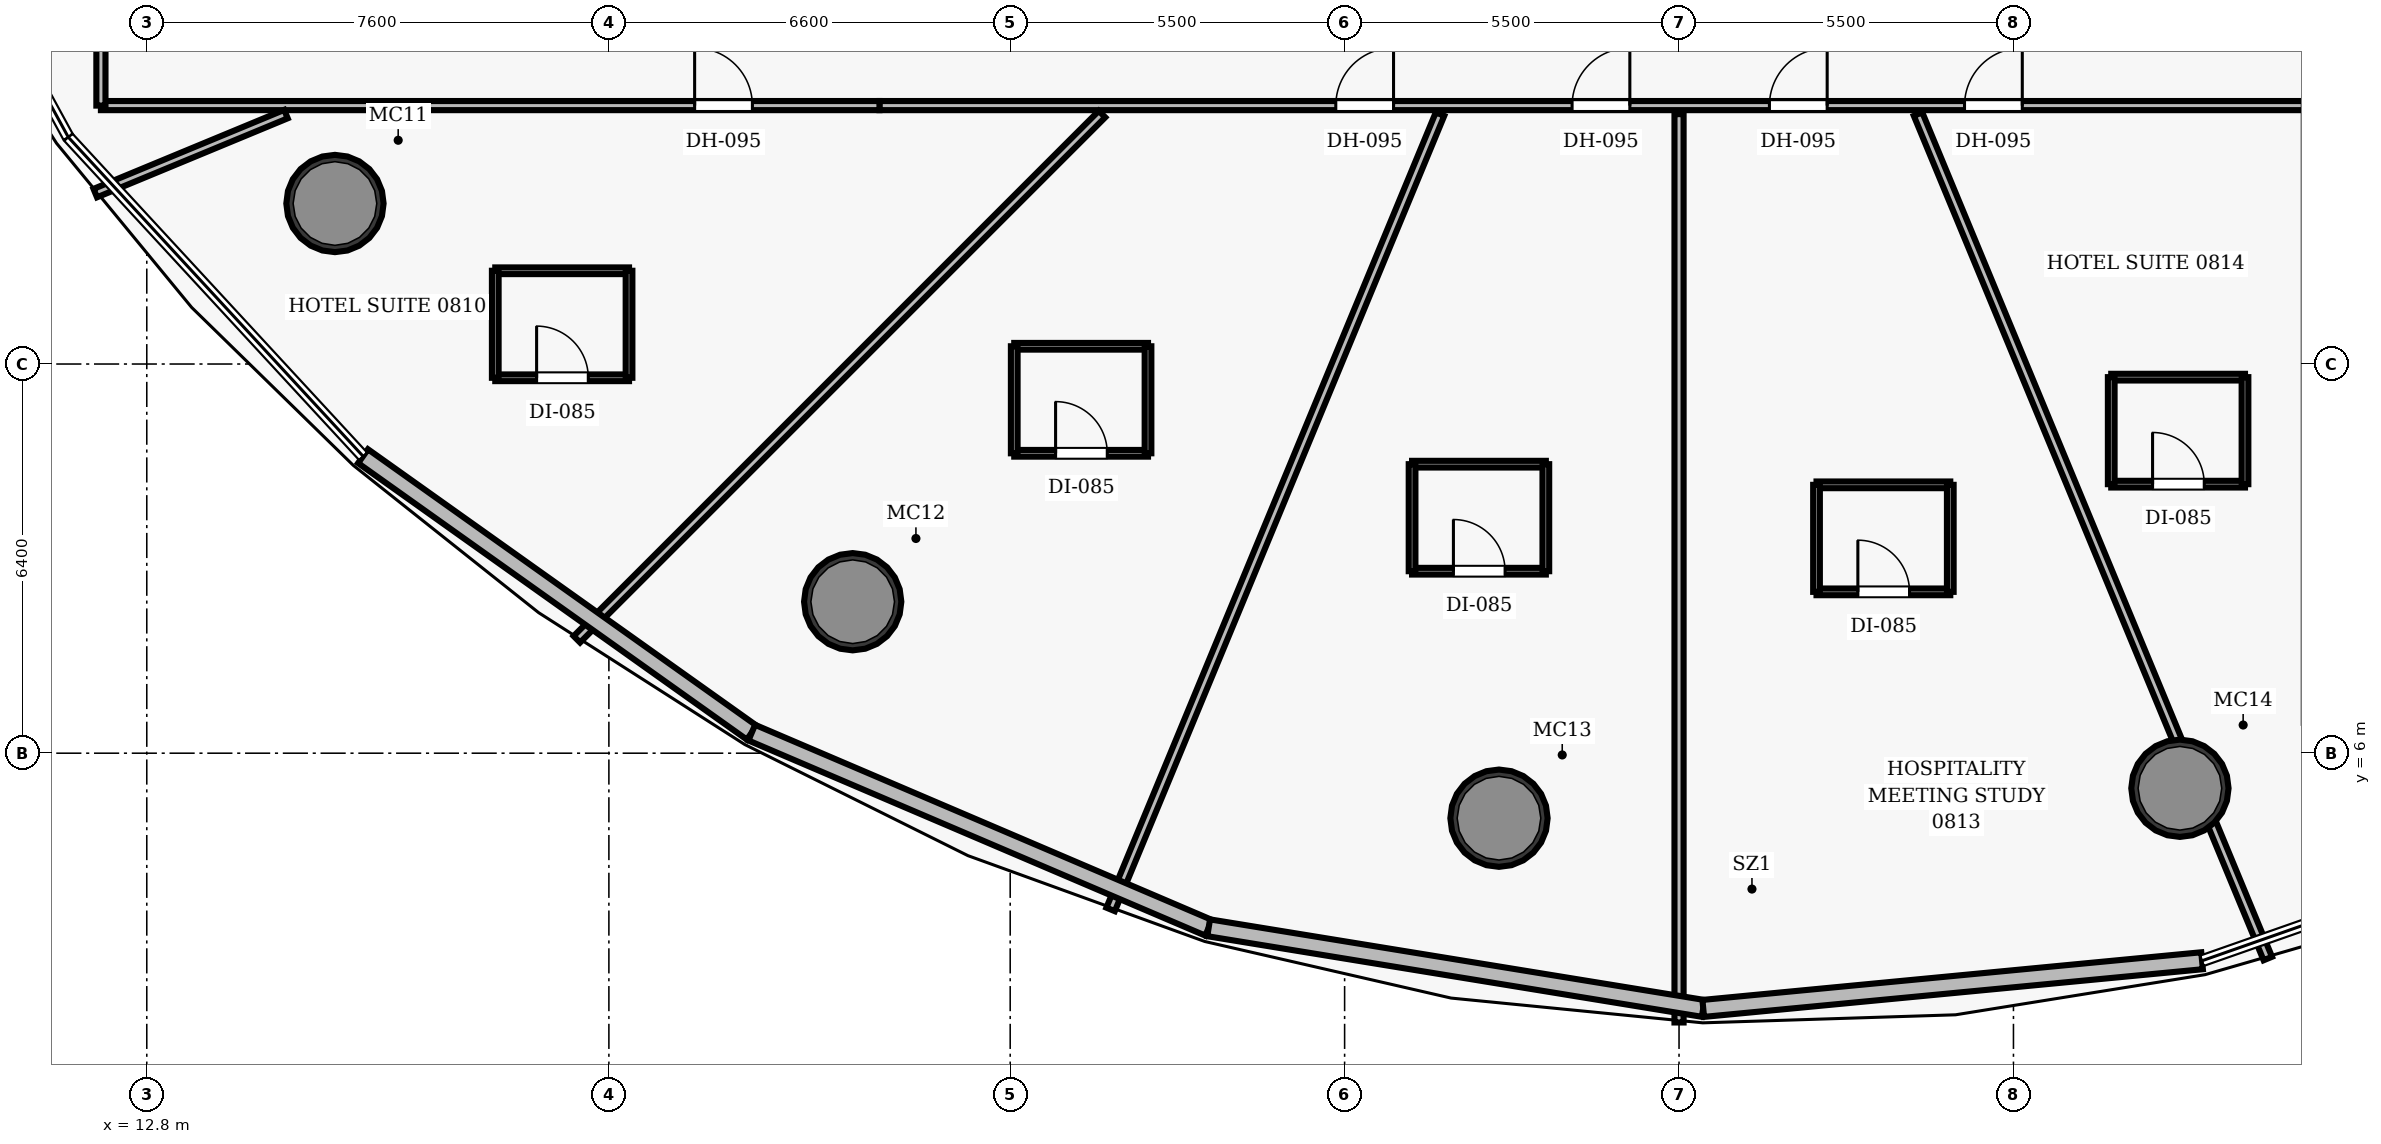
"""IFC4 building model, lengths in metres.
Left out: names, types, materials, properties, quantities, classifications, styles, units other than length and angle.
Written with IfcOpenShell. Run it as: python <this file> out.ifc"""

import sys

from ifc_helpers import new_model, si_unit, direction, frame, frame_2d, origin, origin_2d, place, context, subcontext, project, spatial, rectangle, hollow_circle, extrude, element, fill, save


model = new_model("IFC4")
c1 = context("Model", 3, precision=1e-05, world=origin(), true_north=direction((0.0, 1.0)))
c2 = subcontext(c1, "Body", "Model", "MODEL_VIEW")
j1 = project(units=[si_unit("LENGTHUNIT", "METRE"), si_unit("PLANEANGLEUNIT", "RADIAN")], contexts=[c1])
p1 = place(None, origin())
s1 = spatial("IfcSite", under=j1, at=p1, CompositionType="ELEMENT")
p2 = place(p1, origin())
s2 = spatial("IfcBuilding", under=s1, at=p2, CompositionType="ELEMENT")
p3 = place(p2, frame((0.0, 0.0, 44.9)))
s3 = spatial("IfcBuildingStorey", under=s2, at=p3, CompositionType="ELEMENT", Elevation=44.9)
for number, where, z_axis, x_axis in (
    (1, (15.895, 15.04, 0.0), (0.0, 0.0, 1.0), (1.0, 0.0, 0.0)),
    (2, (24.41, 8.491, 0.0), (0.0, 0.0, 1.0), (1.0, 0.0, 0.0)),
    (3, (35.039, 4.931, 0.0), (0.0, 0.0, 1.0), (1.0, 0.0, 0.0)),
    (4, (46.238, 5.423, 0.0), (0.0, 0.0, 1.0), (1.0, 0.0, 0.0)),
):
    element("IfcColumn", number, at=place(p3, frame(where, z_axis=z_axis, x_axis=x_axis)), inside=s3, PredefinedType="COLUMN", context=c2, shape_type="SweptSolid", body=[
        extrude(hollow_circle(Radius=0.8, WallThickness=0.06, at=origin_2d()), origin(), (0.0, 0.0, 1.0), 3.5),
    ])
p4 = place(p3, frame((24.85, 16.65, 0.0), z_axis=(0.0, 0.0, 1.0), x_axis=(1.0, 0.0, 0.0)))
e5 = element("IfcWall", 5, at=p4, inside=s3, PredefinedType="PARTITIONING", context=c2, shape_type="SweptSolid", body=[
    extrude(rectangle(XDim=23.5, YDim=0.15, at=frame_2d((11.75, 0.0))), origin(), (0.0, 0.0, 1.0), 2.6),
])
p5 = place(p4, frame((7.505, 0.0, 0.0)))
e6 = element("IfcOpeningElement", 6, at=p5, cuts=e5, PredefinedType="OPENING", context=c2, shape_type="SweptSolid", body=[
    extrude(rectangle(XDim=0.95, YDim=2.15, at=frame_2d((0.475, 1.075))), frame((0.0, 0.085, 0.0), z_axis=(0.0, -1.0, 0.0), x_axis=(1.0, 0.0, 0.0)), (0.0, 0.0, 1.0), 0.17),
])
p6 = place(p4, frame((11.391, 0.0, 0.0)))
e7 = element("IfcOpeningElement", 7, at=p6, cuts=e5, PredefinedType="OPENING", context=c2, shape_type="SweptSolid", body=[
    extrude(rectangle(XDim=0.95, YDim=2.15, at=frame_2d((0.475, 1.075))), frame((0.0, 0.085, 0.0), z_axis=(0.0, -1.0, 0.0), x_axis=(1.0, 0.0, 0.0)), (0.0, 0.0, 1.0), 0.17),
])
p7 = place(p4, frame((14.636, 0.0, 0.0)))
e8 = element("IfcOpeningElement", 8, at=p7, cuts=e5, PredefinedType="OPENING", context=c2, shape_type="SweptSolid", body=[
    extrude(rectangle(XDim=0.95, YDim=2.15, at=frame_2d((0.475, 1.075))), frame((0.0, 0.085, 0.0), z_axis=(0.0, -1.0, 0.0), x_axis=(1.0, 0.0, 0.0)), (0.0, 0.0, 1.0), 0.17),
])
p8 = place(p4, frame((17.845, 0.0, 0.0)))
e9 = element("IfcOpeningElement", 9, at=p8, cuts=e5, PredefinedType="OPENING", context=c2, shape_type="SweptSolid", body=[
    extrude(rectangle(XDim=0.95, YDim=2.15, at=frame_2d((0.475, 1.075))), frame((0.0, 0.085, 0.0), z_axis=(0.0, -1.0, 0.0), x_axis=(1.0, 0.0, 0.0)), (0.0, 0.0, 1.0), 0.17),
])
p9 = place(p3, frame((12.046, 16.65, 0.0), z_axis=(0.0, 0.0, 1.0), x_axis=(1.0, 0.0, 0.0)))
e10 = element("IfcWall", 10, at=p9, inside=s3, PredefinedType="PARTITIONING", context=c2, shape_type="SweptSolid", body=[
    extrude(rectangle(XDim=12.804, YDim=0.15, at=frame_2d((6.402, 0.0))), origin(), (0.0, 0.0, 1.0), 2.6),
])
p10 = place(p9, frame((9.764, 0.0, 0.0)))
e11 = element("IfcOpeningElement", 11, at=p10, cuts=e10, PredefinedType="OPENING", context=c2, shape_type="SweptSolid", body=[
    extrude(rectangle(XDim=0.95, YDim=2.15, at=frame_2d((0.475, 1.075))), frame((0.0, 0.085, 0.0), z_axis=(0.0, -1.0, 0.0), x_axis=(1.0, 0.0, 0.0)), (0.0, 0.0, 1.0), 0.17),
])
p11 = place(p3, frame((12.046, 16.65, 0.0), z_axis=(0.0, 0.0, 1.0), x_axis=(0.0, 1.0, 0.0)))
e12 = element("IfcWall", 12, at=p11, inside=s3, PredefinedType="PARTITIONING", context=c2, shape_type="SweptSolid", body=[
    extrude(rectangle(XDim=2.8, YDim=0.15, at=frame_2d((1.4, 0.0))), origin(), (0.0, 0.0, 1.0), 2.6),
])
p12 = place(p3, frame((15.089, 16.51, 0.0), z_axis=(0.0, 0.0, 1.0), x_axis=(-0.923864318354, -0.382720160526, 0.0)))
e13 = element("IfcWall", 13, at=p12, inside=s3, PredefinedType="PARTITIONING", context=c2, shape_type="SweptSolid", body=[
    extrude(rectangle(XDim=3.395, YDim=0.15, at=frame_2d((1.698, 0.0))), origin(), (0.0, 0.0, 1.0), 2.6),
])
p13 = place(p3, frame((28.51, 16.51, 0.0), z_axis=(0.0, 0.0, 1.0), x_axis=(-0.707106781187, -0.707106781187, 0.0)))
e14 = element("IfcWall", 14, at=p13, inside=s3, PredefinedType="PARTITIONING", context=c2, shape_type="SweptSolid", body=[
    extrude(rectangle(XDim=12.215, YDim=0.15, at=frame_2d((6.107, 0.0))), origin(), (0.0, 0.0, 1.0), 2.6),
])
p14 = place(p3, frame((34.069, 16.51, 0.0), z_axis=(0.0, 0.0, 1.0), x_axis=(-0.382679767611, -0.923881050494, 0.0)))
e15 = element("IfcWall", 15, at=p14, inside=s3, PredefinedType="PARTITIONING", context=c2, shape_type="SweptSolid", body=[
    extrude(rectangle(XDim=14.157, YDim=0.15, at=frame_2d((7.078, 0.0))), origin(), (0.0, 0.0, 1.0), 2.6),
])
p15 = place(p3, frame((38.0, 16.51, 0.0), z_axis=(0.0, 0.0, 1.0), x_axis=(0.0, -1.0, 0.0)))
e16 = element("IfcWall", 16, at=p15, inside=s3, PredefinedType="PARTITIONING", context=c2, shape_type="SweptSolid", body=[
    extrude(rectangle(XDim=14.938, YDim=0.15, at=frame_2d((7.469, 0.0))), origin(), (0.0, 0.0, 1.0), 2.6),
])
p16 = place(p3, frame((41.931, 16.51, 0.0), z_axis=(0.0, 0.0, 1.0), x_axis=(0.382685073251, -0.923878852832, 0.0)))
e17 = element("IfcWall", 17, at=p16, inside=s3, PredefinedType="PARTITIONING", context=c2, shape_type="SweptSolid", body=[
    extrude(rectangle(XDim=15.031, YDim=0.15, at=frame_2d((7.516, 0.0))), origin(), (0.0, 0.0, 1.0), 2.6),
])
p17 = place(p3, frame((18.531, 12.174, 0.0), z_axis=(0.0, 0.0, 1.0), x_axis=(1.0, 0.0, 0.0)))
e18 = element("IfcWall", 18, at=p17, inside=s3, PredefinedType="PARTITIONING", context=c2, shape_type="SweptSolid", body=[
    extrude(rectangle(XDim=2.2, YDim=0.11, at=frame_2d((1.1, 0.0))), origin(), (0.0, 0.0, 1.0), 2.6),
])
p18 = place(p17, frame((0.68, 0.0, 0.0)))
e19 = element("IfcOpeningElement", 19, at=p18, cuts=e18, PredefinedType="OPENING", context=c2, shape_type="SweptSolid", body=[
    extrude(rectangle(XDim=0.85, YDim=2.1, at=frame_2d((0.425, 1.05))), frame((0.0, 0.065, 0.0), z_axis=(0.0, -1.0, 0.0), x_axis=(1.0, 0.0, 0.0)), (0.0, 0.0, 1.0), 0.13),
])
p19 = place(p3, frame((18.531, 13.934, 0.0), z_axis=(0.0, 0.0, 1.0), x_axis=(1.0, 0.0, 0.0)))
e20 = element("IfcWall", 20, at=p19, inside=s3, PredefinedType="PARTITIONING", context=c2, shape_type="SweptSolid", body=[
    extrude(rectangle(XDim=2.2, YDim=0.11, at=frame_2d((1.1, 0.0))), origin(), (0.0, 0.0, 1.0), 2.6),
])
for number, where, z_axis, x_axis in (
    (21, (18.531, 12.174, 0.0), (0.0, 0.0, 1.0), (0.0, 1.0, 0.0)),
    (22, (20.731, 12.174, 0.0), (0.0, 0.0, 1.0), (0.0, 1.0, 0.0)),
):
    element("IfcWall", number, at=place(p3, frame(where, z_axis=z_axis, x_axis=x_axis)), inside=s3, PredefinedType="PARTITIONING", context=c2, shape_type="SweptSolid", body=[
        extrude(rectangle(XDim=1.76, YDim=0.11, at=frame_2d((0.88, 0.0))), origin(), (0.0, 0.0, 1.0), 2.6),
    ])
p20 = place(p3, frame((27.067, 10.932, 0.0), z_axis=(0.0, 0.0, 1.0), x_axis=(1.0, 0.0, 0.0)))
e23 = element("IfcWall", 23, at=p20, inside=s3, PredefinedType="PARTITIONING", context=c2, shape_type="SweptSolid", body=[
    extrude(rectangle(XDim=2.2, YDim=0.11, at=frame_2d((1.1, 0.0))), origin(), (0.0, 0.0, 1.0), 2.6),
])
p21 = place(p20, frame((0.68, 0.0, 0.0)))
e24 = element("IfcOpeningElement", 24, at=p21, cuts=e23, PredefinedType="OPENING", context=c2, shape_type="SweptSolid", body=[
    extrude(rectangle(XDim=0.85, YDim=2.1, at=frame_2d((0.425, 1.05))), frame((0.0, 0.065, 0.0), z_axis=(0.0, -1.0, 0.0), x_axis=(1.0, 0.0, 0.0)), (0.0, 0.0, 1.0), 0.13),
])
p22 = place(p3, frame((27.067, 12.692, 0.0), z_axis=(0.0, 0.0, 1.0), x_axis=(1.0, 0.0, 0.0)))
e25 = element("IfcWall", 25, at=p22, inside=s3, PredefinedType="PARTITIONING", context=c2, shape_type="SweptSolid", body=[
    extrude(rectangle(XDim=2.2, YDim=0.11, at=frame_2d((1.1, 0.0))), origin(), (0.0, 0.0, 1.0), 2.6),
])
for number, where, z_axis, x_axis in (
    (26, (27.067, 10.932, 0.0), (0.0, 0.0, 1.0), (0.0, 1.0, 0.0)),
    (27, (29.267, 10.932, 0.0), (0.0, 0.0, 1.0), (0.0, 1.0, 0.0)),
):
    element("IfcWall", number, at=place(p3, frame(where, z_axis=z_axis, x_axis=x_axis)), inside=s3, PredefinedType="PARTITIONING", context=c2, shape_type="SweptSolid", body=[
        extrude(rectangle(XDim=1.76, YDim=0.11, at=frame_2d((0.88, 0.0))), origin(), (0.0, 0.0, 1.0), 2.6),
    ])
p23 = place(p3, frame((33.609, 8.993, 0.0), z_axis=(0.0, 0.0, 1.0), x_axis=(1.0, 0.0, 0.0)))
e28 = element("IfcWall", 28, at=p23, inside=s3, PredefinedType="PARTITIONING", context=c2, shape_type="SweptSolid", body=[
    extrude(rectangle(XDim=2.2, YDim=0.11, at=frame_2d((1.1, 0.0))), origin(), (0.0, 0.0, 1.0), 2.6),
])
p24 = place(p23, frame((0.68, 0.0, 0.0)))
e29 = element("IfcOpeningElement", 29, at=p24, cuts=e28, PredefinedType="OPENING", context=c2, shape_type="SweptSolid", body=[
    extrude(rectangle(XDim=0.85, YDim=2.1, at=frame_2d((0.425, 1.05))), frame((0.0, 0.065, 0.0), z_axis=(0.0, -1.0, 0.0), x_axis=(1.0, 0.0, 0.0)), (0.0, 0.0, 1.0), 0.13),
])
p25 = place(p3, frame((33.609, 10.753, 0.0), z_axis=(0.0, 0.0, 1.0), x_axis=(1.0, 0.0, 0.0)))
e30 = element("IfcWall", 30, at=p25, inside=s3, PredefinedType="PARTITIONING", context=c2, shape_type="SweptSolid", body=[
    extrude(rectangle(XDim=2.2, YDim=0.11, at=frame_2d((1.1, 0.0))), origin(), (0.0, 0.0, 1.0), 2.6),
])
for number, where, z_axis, x_axis in (
    (31, (33.609, 8.993, 0.0), (0.0, 0.0, 1.0), (0.0, 1.0, 0.0)),
    (32, (35.809, 8.993, 0.0), (0.0, 0.0, 1.0), (0.0, 1.0, 0.0)),
):
    element("IfcWall", number, at=place(p3, frame(where, z_axis=z_axis, x_axis=x_axis)), inside=s3, PredefinedType="PARTITIONING", context=c2, shape_type="SweptSolid", body=[
        extrude(rectangle(XDim=1.76, YDim=0.11, at=frame_2d((0.88, 0.0))), origin(), (0.0, 0.0, 1.0), 2.6),
    ])
p26 = place(p3, frame((40.261, 8.653, 0.0), z_axis=(0.0, 0.0, 1.0), x_axis=(1.0, 0.0, 0.0)))
e33 = element("IfcWall", 33, at=p26, inside=s3, PredefinedType="PARTITIONING", context=c2, shape_type="SweptSolid", body=[
    extrude(rectangle(XDim=2.2, YDim=0.11, at=frame_2d((1.1, 0.0))), origin(), (0.0, 0.0, 1.0), 2.6),
])
p27 = place(p26, frame((0.68, 0.0, 0.0)))
e34 = element("IfcOpeningElement", 34, at=p27, cuts=e33, PredefinedType="OPENING", context=c2, shape_type="SweptSolid", body=[
    extrude(rectangle(XDim=0.85, YDim=2.1, at=frame_2d((0.425, 1.05))), frame((0.0, 0.065, 0.0), z_axis=(0.0, -1.0, 0.0), x_axis=(1.0, 0.0, 0.0)), (0.0, 0.0, 1.0), 0.13),
])
p28 = place(p3, frame((40.261, 10.413, 0.0), z_axis=(0.0, 0.0, 1.0), x_axis=(1.0, 0.0, 0.0)))
e35 = element("IfcWall", 35, at=p28, inside=s3, PredefinedType="PARTITIONING", context=c2, shape_type="SweptSolid", body=[
    extrude(rectangle(XDim=2.2, YDim=0.11, at=frame_2d((1.1, 0.0))), origin(), (0.0, 0.0, 1.0), 2.6),
])
for number, where, z_axis, x_axis in (
    (36, (40.261, 8.653, 0.0), (0.0, 0.0, 1.0), (0.0, 1.0, 0.0)),
    (37, (42.461, 8.653, 0.0), (0.0, 0.0, 1.0), (0.0, 1.0, 0.0)),
):
    element("IfcWall", number, at=place(p3, frame(where, z_axis=z_axis, x_axis=x_axis)), inside=s3, PredefinedType="PARTITIONING", context=c2, shape_type="SweptSolid", body=[
        extrude(rectangle(XDim=1.76, YDim=0.11, at=frame_2d((0.88, 0.0))), origin(), (0.0, 0.0, 1.0), 2.6),
    ])
p29 = place(p3, frame((45.108, 10.424, 0.0), z_axis=(0.0, 0.0, 1.0), x_axis=(1.0, 0.0, 0.0)))
e38 = element("IfcWall", 38, at=p29, inside=s3, PredefinedType="PARTITIONING", context=c2, shape_type="SweptSolid", body=[
    extrude(rectangle(XDim=2.2, YDim=0.11, at=frame_2d((1.1, 0.0))), origin(), (0.0, 0.0, 1.0), 2.6),
])
p30 = place(p29, frame((0.68, 0.0, 0.0)))
e39 = element("IfcOpeningElement", 39, at=p30, cuts=e38, PredefinedType="OPENING", context=c2, shape_type="SweptSolid", body=[
    extrude(rectangle(XDim=0.85, YDim=2.1, at=frame_2d((0.425, 1.05))), frame((0.0, 0.065, 0.0), z_axis=(0.0, -1.0, 0.0), x_axis=(1.0, 0.0, 0.0)), (0.0, 0.0, 1.0), 0.13),
])
p31 = place(p3, frame((45.108, 12.184, 0.0), z_axis=(0.0, 0.0, 1.0), x_axis=(1.0, 0.0, 0.0)))
e40 = element("IfcWall", 40, at=p31, inside=s3, PredefinedType="PARTITIONING", context=c2, shape_type="SweptSolid", body=[
    extrude(rectangle(XDim=2.2, YDim=0.11, at=frame_2d((1.1, 0.0))), origin(), (0.0, 0.0, 1.0), 2.6),
])
for number, where, z_axis, x_axis in (
    (41, (45.108, 10.424, 0.0), (0.0, 0.0, 1.0), (0.0, 1.0, 0.0)),
    (42, (47.308, 10.424, 0.0), (0.0, 0.0, 1.0), (0.0, 1.0, 0.0)),
):
    element("IfcWall", number, at=place(p3, frame(where, z_axis=z_axis, x_axis=x_axis)), inside=s3, PredefinedType="PARTITIONING", context=c2, shape_type="SweptSolid", body=[
        extrude(rectangle(XDim=1.76, YDim=0.11, at=frame_2d((0.88, 0.0))), origin(), (0.0, 0.0, 1.0), 2.6),
    ])
p32 = place(p3, frame((22.75, 6.338, 0.0), z_axis=(0.0, 0.0, 1.0), x_axis=(-0.814953364859, 0.579526542193, 0.0)))
e43 = element("IfcWall", 43, at=p32, inside=s3, PredefinedType="SOLIDWALL", context=c2, shape_type="SweptSolid", body=[
    extrude(rectangle(XDim=7.845, YDim=0.28, at=frame_2d((3.922, 0.0))), origin(), (0.0, 0.0, 1.0), 3.25),
])
p33 = place(p3, frame((30.264, 3.129, 0.0), z_axis=(0.0, 0.0, 1.0), x_axis=(-0.919648117611, 0.392743351026, 0.0)))
e44 = element("IfcWall", 44, at=p33, inside=s3, PredefinedType="SOLIDWALL", context=c2, shape_type="SweptSolid", body=[
    extrude(rectangle(XDim=8.171, YDim=0.28, at=frame_2d((4.085, 0.0))), origin(), (0.0, 0.0, 1.0), 3.25),
])
for number, where, z_axis, x_axis in (
    (45, (38.398, 1.803, 0.0), (0.0, 0.0, 1.0), (-0.987, 0.161, 0.0)),
    (46, (46.602, 2.587, 0.0), (0.0, 0.0, 1.0), (-0.995, -0.095, 0.0)),
):
    element("IfcWall", number, at=place(p3, frame(where, z_axis=z_axis, x_axis=x_axis)), inside=s3, PredefinedType="SOLIDWALL", context=c2, shape_type="SweptSolid", body=[
        extrude(rectangle(XDim=8.241, YDim=0.28, at=frame_2d((4.121, 0.0))), origin(), (0.0, 0.0, 1.0), 3.25),
    ])
p34 = place(p10, origin())
e47 = element("IfcDoor", 47, at=p34, inside=s3, OperationType="SINGLE_SWING_LEFT", PredefinedType="DOOR", context=c2, shape_type="SweptSolid", body=[
    extrude(rectangle(XDim=0.95, YDim=2.15, at=frame_2d((0.475, 1.075))), frame((0.0, 0.025, 0.0), z_axis=(0.0, -1.0, 0.0), x_axis=(1.0, 0.0, 0.0)), (0.0, 0.0, 1.0), 0.05),
])
fill(e11, e47)
p35 = place(p18, origin())
e48 = element("IfcDoor", 48, at=p35, inside=s3, OperationType="SINGLE_SWING_LEFT", PredefinedType="DOOR", context=c2, shape_type="SweptSolid", body=[
    extrude(rectangle(XDim=0.85, YDim=2.1, at=frame_2d((0.425, 1.05))), frame((0.0, 0.025, 0.0), z_axis=(0.0, -1.0, 0.0), x_axis=(1.0, 0.0, 0.0)), (0.0, 0.0, 1.0), 0.05),
])
fill(e19, e48)
p36 = place(p5, origin())
e49 = element("IfcDoor", 49, at=p36, inside=s3, OperationType="SINGLE_SWING_RIGHT", PredefinedType="DOOR", context=c2, shape_type="SweptSolid", body=[
    extrude(rectangle(XDim=0.95, YDim=2.15, at=frame_2d((0.475, 1.075))), frame((0.0, 0.025, 0.0), z_axis=(0.0, -1.0, 0.0), x_axis=(1.0, 0.0, 0.0)), (0.0, 0.0, 1.0), 0.05),
])
fill(e6, e49)
p37 = place(p21, origin())
e50 = element("IfcDoor", 50, at=p37, inside=s3, OperationType="SINGLE_SWING_LEFT", PredefinedType="DOOR", context=c2, shape_type="SweptSolid", body=[
    extrude(rectangle(XDim=0.85, YDim=2.1, at=frame_2d((0.425, 1.05))), frame((0.0, 0.025, 0.0), z_axis=(0.0, -1.0, 0.0), x_axis=(1.0, 0.0, 0.0)), (0.0, 0.0, 1.0), 0.05),
])
fill(e24, e50)
p38 = place(p6, origin())
e51 = element("IfcDoor", 51, at=p38, inside=s3, OperationType="SINGLE_SWING_RIGHT", PredefinedType="DOOR", context=c2, shape_type="SweptSolid", body=[
    extrude(rectangle(XDim=0.95, YDim=2.15, at=frame_2d((0.475, 1.075))), frame((0.0, 0.025, 0.0), z_axis=(0.0, -1.0, 0.0), x_axis=(1.0, 0.0, 0.0)), (0.0, 0.0, 1.0), 0.05),
])
fill(e7, e51)
p39 = place(p24, origin())
e52 = element("IfcDoor", 52, at=p39, inside=s3, OperationType="SINGLE_SWING_LEFT", PredefinedType="DOOR", context=c2, shape_type="SweptSolid", body=[
    extrude(rectangle(XDim=0.85, YDim=2.1, at=frame_2d((0.425, 1.05))), frame((0.0, 0.025, 0.0), z_axis=(0.0, -1.0, 0.0), x_axis=(1.0, 0.0, 0.0)), (0.0, 0.0, 1.0), 0.05),
])
fill(e29, e52)
p40 = place(p7, origin())
e53 = element("IfcDoor", 53, at=p40, inside=s3, OperationType="SINGLE_SWING_RIGHT", PredefinedType="DOOR", context=c2, shape_type="SweptSolid", body=[
    extrude(rectangle(XDim=0.95, YDim=2.15, at=frame_2d((0.475, 1.075))), frame((0.0, 0.025, 0.0), z_axis=(0.0, -1.0, 0.0), x_axis=(1.0, 0.0, 0.0)), (0.0, 0.0, 1.0), 0.05),
])
fill(e8, e53)
p41 = place(p27, origin())
e54 = element("IfcDoor", 54, at=p41, inside=s3, OperationType="SINGLE_SWING_LEFT", PredefinedType="DOOR", context=c2, shape_type="SweptSolid", body=[
    extrude(rectangle(XDim=0.85, YDim=2.1, at=frame_2d((0.425, 1.05))), frame((0.0, 0.025, 0.0), z_axis=(0.0, -1.0, 0.0), x_axis=(1.0, 0.0, 0.0)), (0.0, 0.0, 1.0), 0.05),
])
fill(e34, e54)
p42 = place(p8, origin())
e55 = element("IfcDoor", 55, at=p42, inside=s3, OperationType="SINGLE_SWING_RIGHT", PredefinedType="DOOR", context=c2, shape_type="SweptSolid", body=[
    extrude(rectangle(XDim=0.95, YDim=2.15, at=frame_2d((0.475, 1.075))), frame((0.0, 0.025, 0.0), z_axis=(0.0, -1.0, 0.0), x_axis=(1.0, 0.0, 0.0)), (0.0, 0.0, 1.0), 0.05),
])
fill(e9, e55)
p43 = place(p30, origin())
e56 = element("IfcDoor", 56, at=p43, inside=s3, OperationType="SINGLE_SWING_LEFT", PredefinedType="DOOR", context=c2, shape_type="SweptSolid", body=[
    extrude(rectangle(XDim=0.85, YDim=2.1, at=frame_2d((0.425, 1.05))), frame((0.0, 0.025, 0.0), z_axis=(0.0, -1.0, 0.0), x_axis=(1.0, 0.0, 0.0)), (0.0, 0.0, 1.0), 0.05),
])
fill(e39, e56)
save(model, sys.argv[1])
